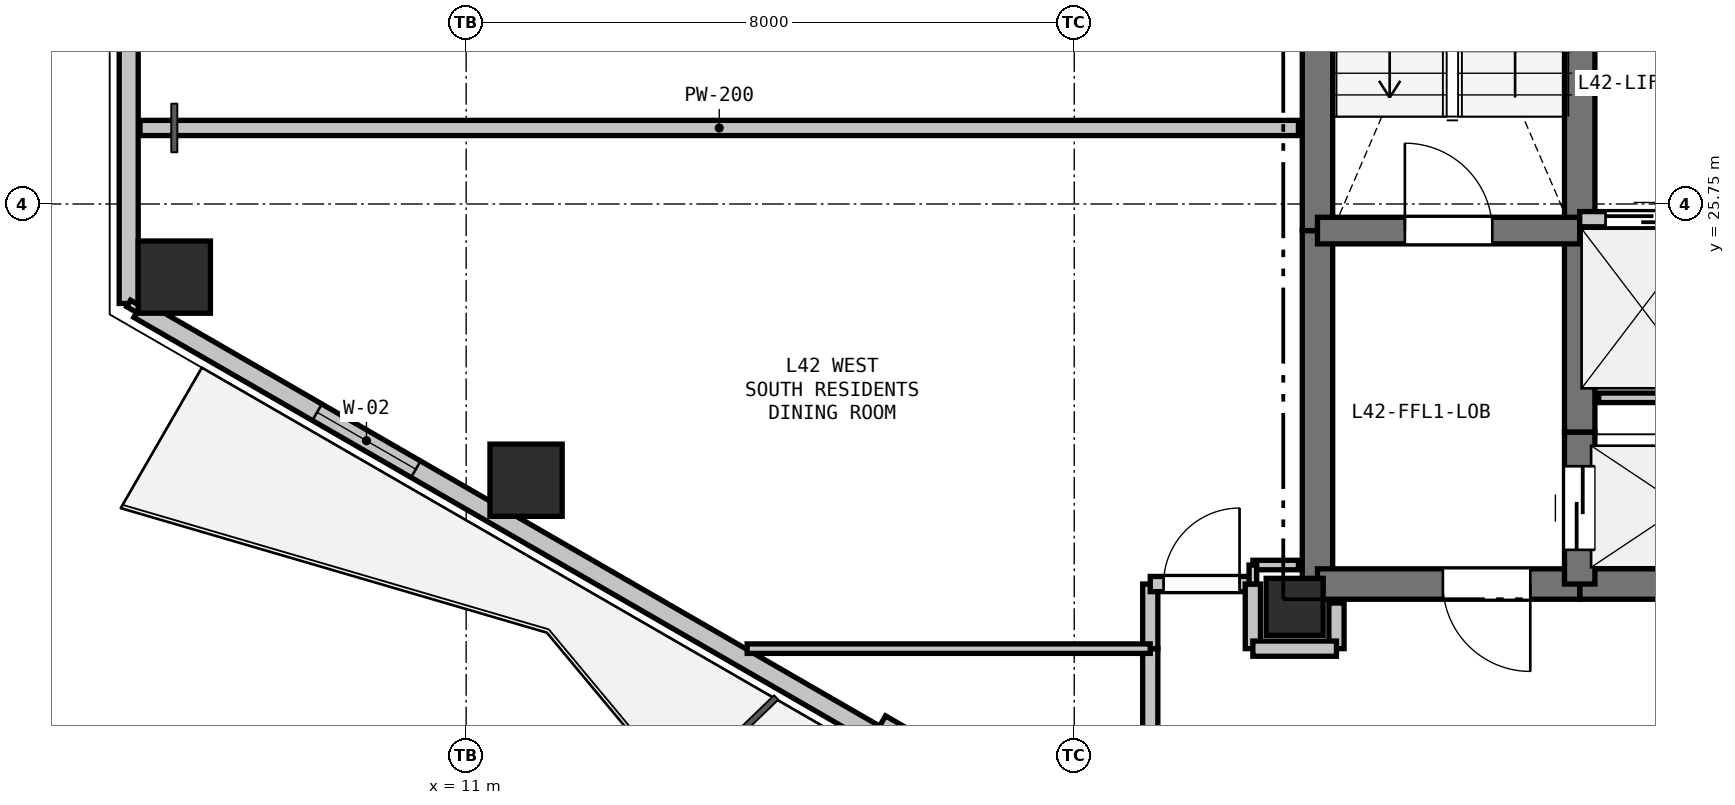
"""IFC4 building model, lengths in metres.
Left out: names, types, materials, properties, quantities, classifications, styles, units other than length and angle.
Written with IfcOpenShell. Run it as: python <this file> out.ifc"""

import sys

from ifc_helpers import new_model, si_unit, direction, frame, frame_2d, origin, origin_2d, place, context, subcontext, project, spatial, rectangle, hollow_rectangle, extrude, element, fill, save


model = new_model("IFC4")
c1 = context("Model", 3, precision=1e-05, world=origin(), true_north=direction((0.0, 1.0)))
c2 = subcontext(c1, "Body", "Model", "MODEL_VIEW")
j1 = project(units=[si_unit("LENGTHUNIT", "METRE"), si_unit("PLANEANGLEUNIT", "RADIAN")], contexts=[c1])
p1 = place(None, origin())
s1 = spatial("IfcSite", under=j1, at=p1, CompositionType="ELEMENT")
p2 = place(p1, origin())
s2 = spatial("IfcBuilding", under=s1, at=p2, CompositionType="ELEMENT")
p3 = place(p2, frame((0.0, 0.0, 150.9)))
s3 = spatial("IfcBuildingStorey", under=s2, at=p3, CompositionType="ELEMENT", Elevation=150.9)
p4 = place(p3, frame((21.9, 20.45, 0.0), z_axis=(0.0, 0.0, 1.0), x_axis=(1.0, 0.0, 0.0)))
e1 = element("IfcColumn", 1, at=p4, inside=s3, PredefinedType="COLUMN", context=c2, shape_type="SweptSolid", body=[
    extrude(rectangle(XDim=0.75, YDim=0.75, at=origin_2d()), origin(), (0.0, 0.0, 1.0), 3.3),
])
for number, where, z_axis, x_axis in (
    (2, (11.788, 22.116, 0.0), (0.0, 0.0, 1.0), (1.0, 0.0, 0.0)),
    (3, (7.16, 24.788, 0.0), (0.0, 0.0, 1.0), (1.0, 0.0, 0.0)),
):
    element("IfcColumn", number, at=place(p3, frame(where, z_axis=z_axis, x_axis=x_axis)), inside=s3, PredefinedType="COLUMN", context=c2, shape_type="SweptSolid", body=[
        extrude(hollow_rectangle(XDim=0.95, YDim=0.95, WallThickness=0.028, at=origin_2d()), origin(), (0.0, 0.0, 1.0), 3.3),
    ])
p5 = place(p3, frame((6.56, 24.441, 0.0), z_axis=(0.0, 0.0, 1.0), x_axis=(0.0, 1.0, 0.0)))
e4 = element("IfcWall", 4, at=p5, inside=s3, PredefinedType="SOLIDWALL", context=c2, shape_type="SweptSolid", body=[
    extrude(rectangle(XDim=4.617, YDim=0.25, at=frame_2d((2.309, 0.0))), origin(), (0.0, 0.0, 1.0), 2.68),
])
p6 = place(p3, frame((16.378, 18.773, 0.0), z_axis=(0.0, 0.0, 1.0), x_axis=(-0.866027848477, 0.499995765644, 0.0)))
e5 = element("IfcWall", 5, at=p6, inside=s3, PredefinedType="SOLIDWALL", context=c2, shape_type="SweptSolid", body=[
    extrude(rectangle(XDim=11.186, YDim=0.25, at=frame_2d((5.593, 0.0))), origin(), (0.0, 0.0, 1.0), 2.68),
])
p7 = place(p6, frame((6.974, 0.0, 0.9)))
e6 = element("IfcOpeningElement", 6, at=p7, cuts=e5, PredefinedType="OPENING", context=c2, shape_type="SweptSolid", body=[
    extrude(rectangle(XDim=1.5, YDim=1.5, at=frame_2d((0.75, 0.75))), frame((0.0, 0.135, 0.0), z_axis=(0.0, -1.0, 0.0), x_axis=(1.0, 0.0, 0.0)), (0.0, 0.0, 1.0), 0.27),
])
p8 = place(p3, frame((17.94, 18.079, 0.0), z_axis=(0.0, 0.0, 1.0), x_axis=(-0.865989465428, 0.500062241894, 0.0)))
e7 = element("IfcWall", 7, at=p8, inside=s3, PredefinedType="PARAPET", context=c2, shape_type="SweptSolid", body=[
    extrude(rectangle(XDim=1.7, YDim=0.2, at=frame_2d((0.85, 0.0))), origin(), (0.0, 0.0, 1.0), 2.68),
])
p9 = place(p3, frame((22.2, 20.75, 0.0), z_axis=(0.0, 0.0, 1.0), x_axis=(0.0, 1.0, 0.0)))
e8 = element("IfcWall", 8, at=p9, inside=s3, PredefinedType="SHEAR", context=c2, shape_type="SweptSolid", body=[
    extrude(rectangle(XDim=4.65, YDim=0.4, at=frame_2d((2.325, 0.0))), origin(), (0.0, 0.0, 1.0), 3.06),
])
p10 = place(p3, frame((22.2, 25.4, 0.0), z_axis=(0.0, 0.0, 1.0), x_axis=(0.0, 1.0, 0.0)))
e9 = element("IfcWall", 9, at=p10, inside=s3, PredefinedType="SHEAR", context=c2, shape_type="SweptSolid", body=[
    extrude(rectangle(XDim=7.35, YDim=0.4, at=frame_2d((3.675, 0.0))), origin(), (0.0, 0.0, 1.0), 3.06),
])
p11 = place(p3, frame((28.35, 20.75, 0.0), z_axis=(0.0, 0.0, 1.0), x_axis=(-1.0, 0.0, 0.0)))
e10 = element("IfcWall", 10, at=p11, inside=s3, PredefinedType="SHEAR", context=c2, shape_type="SweptSolid", body=[
    extrude(rectangle(XDim=2.7, YDim=0.4, at=frame_2d((1.35, 0.0))), origin(), (0.0, 0.0, 1.0), 3.06),
])
p12 = place(p3, frame((25.65, 20.75, 0.0), z_axis=(0.0, 0.0, 1.0), x_axis=(-1.0, 0.0, 0.0)))
e11 = element("IfcWall", 11, at=p12, inside=s3, PredefinedType="SHEAR", context=c2, shape_type="SweptSolid", body=[
    extrude(rectangle(XDim=3.45, YDim=0.4, at=frame_2d((1.725, 0.0))), origin(), (0.0, 0.0, 1.0), 3.06),
])
p13 = place(p12, frame((0.65, 0.0, 0.0)))
e12 = element("IfcOpeningElement", 12, at=p13, cuts=e11, PredefinedType="OPENING", context=c2, shape_type="SweptSolid", body=[
    extrude(rectangle(XDim=1.15, YDim=2.15, at=frame_2d((0.575, 1.075))), frame((0.0, 0.21, 0.0), z_axis=(0.0, -1.0, 0.0), x_axis=(1.0, 0.0, 0.0)), (0.0, 0.0, 1.0), 0.42),
])
p14 = place(p3, frame((25.65, 20.75, 0.0), z_axis=(0.0, 0.0, 1.0), x_axis=(0.0, 1.0, 0.0)))
e13 = element("IfcWall", 13, at=p14, inside=s3, PredefinedType="SHEAR", context=c2, shape_type="SweptSolid", body=[
    extrude(rectangle(XDim=2.0, YDim=0.4, at=frame_2d((1.0, 0.0))), origin(), (0.0, 0.0, 1.0), 3.06),
])
p15 = place(p14, frame((0.45, 0.0, 0.0)))
e14 = element("IfcOpeningElement", 14, at=p15, cuts=e13, PredefinedType="OPENING", context=c2, shape_type="SweptSolid", body=[
    extrude(rectangle(XDim=1.1, YDim=2.15, at=frame_2d((0.55, 1.075))), frame((0.0, 0.21, 0.0), z_axis=(0.0, -1.0, 0.0), x_axis=(1.0, 0.0, 0.0)), (0.0, 0.0, 1.0), 0.42),
])
p16 = place(p3, frame((25.65, 22.75, 0.0), z_axis=(0.0, 0.0, 1.0), x_axis=(0.0, 1.0, 0.0)))
e15 = element("IfcWall", 15, at=p16, inside=s3, PredefinedType="SHEAR", context=c2, shape_type="SweptSolid", body=[
    extrude(rectangle(XDim=2.8, YDim=0.4, at=frame_2d((1.4, 0.0))), origin(), (0.0, 0.0, 1.0), 3.06),
])
p17 = place(p3, frame((25.65, 25.55, 0.0), z_axis=(0.0, 0.0, 1.0), x_axis=(0.0, 1.0, 0.0)))
e16 = element("IfcWall", 16, at=p17, inside=s3, PredefinedType="SHEAR", context=c2, shape_type="SweptSolid", body=[
    extrude(rectangle(XDim=2.4, YDim=0.4, at=frame_2d((1.2, 0.0))), origin(), (0.0, 0.0, 1.0), 3.06),
])
p18 = place(p3, frame((22.2, 25.4, 0.0), z_axis=(0.0, 0.0, 1.0), x_axis=(1.0, 0.0, 0.0)))
e17 = element("IfcWall", 17, at=p18, inside=s3, PredefinedType="SHEAR", context=c2, shape_type="SweptSolid", body=[
    extrude(rectangle(XDim=3.45, YDim=0.35, at=frame_2d((1.725, 0.0))), origin(), (0.0, 0.0, 1.0), 3.06),
])
p19 = place(p18, frame((1.15, 0.0, 0.0)))
e18 = element("IfcOpeningElement", 18, at=p19, cuts=e17, PredefinedType="OPENING", context=c2, shape_type="SweptSolid", body=[
    extrude(rectangle(XDim=1.15, YDim=2.15, at=frame_2d((0.575, 1.075))), frame((0.0, 0.185, 0.0), z_axis=(0.0, -1.0, 0.0), x_axis=(1.0, 0.0, 0.0)), (0.0, 0.0, 1.0), 0.37),
])
p20 = place(p3, frame((25.65, 25.55, 0.0), z_axis=(0.0, 0.0, 1.0), x_axis=(1.0, 0.0, 0.0)))
e19 = element("IfcWall", 19, at=p20, inside=s3, PredefinedType="PARTITIONING", context=c2, shape_type="SweptSolid", body=[
    extrude(rectangle(XDim=4.95, YDim=0.2, at=frame_2d((2.475, 0.0))), origin(), (0.0, 0.0, 1.0), 3.06),
])
p21 = place(p20, frame((0.34, 0.0, 0.0)))
e20 = element("IfcOpeningElement", 20, at=p21, cuts=e19, PredefinedType="OPENING", context=c2, shape_type="SweptSolid", body=[
    extrude(rectangle(XDim=1.1, YDim=2.15, at=frame_2d((0.55, 1.075))), frame((0.0, 0.11, 0.0), z_axis=(0.0, -1.0, 0.0), x_axis=(1.0, 0.0, 0.0)), (0.0, 0.0, 1.0), 0.22),
])
p22 = place(p20, frame((1.99, 0.0, 0.0)))
e21 = element("IfcOpeningElement", 21, at=p22, cuts=e19, PredefinedType="OPENING", context=c2, shape_type="SweptSolid", body=[
    extrude(rectangle(XDim=1.1, YDim=2.15, at=frame_2d((0.55, 1.075))), frame((0.0, 0.11, 0.0), z_axis=(0.0, -1.0, 0.0), x_axis=(1.0, 0.0, 0.0)), (0.0, 0.0, 1.0), 0.22),
])
p23 = place(p20, frame((3.64, 0.0, 0.0)))
e22 = element("IfcOpeningElement", 22, at=p23, cuts=e19, PredefinedType="OPENING", context=c2, shape_type="SweptSolid", body=[
    extrude(rectangle(XDim=1.1, YDim=2.15, at=frame_2d((0.55, 1.075))), frame((0.0, 0.11, 0.0), z_axis=(0.0, -1.0, 0.0), x_axis=(1.0, 0.0, 0.0)), (0.0, 0.0, 1.0), 0.22),
])
p24 = place(p3, frame((25.9, 23.2, 0.0), z_axis=(0.0, 0.0, 1.0), x_axis=(1.0, 0.0, 0.0)))
e23 = element("IfcWall", 23, at=p24, inside=s3, PredefinedType="PARTITIONING", context=c2, shape_type="SweptSolid", body=[
    extrude(rectangle(XDim=1.4, YDim=0.125, at=frame_2d((0.7, 0.0))), origin(), (0.0, 0.0, 1.0), 3.06),
])
p25 = place(p3, frame((22.45, 19.9, 0.0), z_axis=(0.0, 0.0, 1.0), x_axis=(0.0, 1.0, 0.0)))
e24 = element("IfcWall", 24, at=p25, inside=s3, PredefinedType="PARTITIONING", context=c2, shape_type="SweptSolid", body=[
    extrude(rectangle(XDim=0.6, YDim=0.2, at=frame_2d((0.3, 0.0))), origin(), (0.0, 0.0, 1.0), 2.433),
])
p26 = place(p3, frame((20.0, 18.15, 0.0), z_axis=(0.0, 0.0, 1.0), x_axis=(0.0, 1.0, 0.0)))
e25 = element("IfcWall", 25, at=p26, inside=s3, PredefinedType="PARTITIONING", context=c2, shape_type="SweptSolid", body=[
    extrude(rectangle(XDim=1.75, YDim=0.2, at=frame_2d((0.875, 0.0))), origin(), (0.0, 0.0, 1.0), 3.06),
])
p27 = place(p3, frame((20.0, 19.9, 0.0), z_axis=(0.0, 0.0, 1.0), x_axis=(0.0, 1.0, 0.0)))
e26 = element("IfcWall", 26, at=p27, inside=s3, PredefinedType="PARTITIONING", context=c2, shape_type="SweptSolid", body=[
    extrude(rectangle(XDim=0.85, YDim=0.2, at=frame_2d((0.425, 0.0))), origin(), (0.0, 0.0, 1.0), 3.06),
])
p28 = place(p3, frame((20.0, 20.75, 0.0), z_axis=(0.0, 0.0, 1.0), x_axis=(1.0, 0.0, 0.0)))
e27 = element("IfcWall", 27, at=p28, inside=s3, PredefinedType="PARTITIONING", context=c2, shape_type="SweptSolid", body=[
    extrude(rectangle(XDim=1.35, YDim=0.2, at=frame_2d((0.675, 0.0))), origin(), (0.0, 0.0, 1.0), 2.433),
])
p29 = place(p28, frame((0.175, 0.0, 0.0)))
e28 = element("IfcOpeningElement", 28, at=p29, cuts=e27, PredefinedType="OPENING", context=c2, shape_type="SweptSolid", body=[
    extrude(rectangle(XDim=1.0, YDim=2.15, at=frame_2d((0.5, 1.075))), frame((0.0, 0.11, 0.0), z_axis=(0.0, -1.0, 0.0), x_axis=(1.0, 0.0, 0.0)), (0.0, 0.0, 1.0), 0.22),
])
p30 = place(p3, frame((21.35, 20.75, 0.0), z_axis=(0.0, 0.0, 1.0), x_axis=(0.0, -1.0, 0.0)))
e29 = element("IfcWall", 29, at=p30, inside=s3, PredefinedType="PARTITIONING", context=c2, shape_type="SweptSolid", body=[
    extrude(rectangle(XDim=0.85, YDim=0.2, at=frame_2d((0.425, 0.0))), origin(), (0.0, 0.0, 1.0), 2.433),
])
p31 = place(p3, frame((21.35, 19.9, 0.0), z_axis=(0.0, 0.0, 1.0), x_axis=(1.0, 0.0, 0.0)))
e30 = element("IfcWall", 30, at=p31, inside=s3, PredefinedType="PARTITIONING", context=c2, shape_type="SweptSolid", body=[
    extrude(rectangle(XDim=1.1, YDim=0.2, at=frame_2d((0.55, 0.0))), origin(), (0.0, 0.0, 1.0), 2.433),
])
p32 = place(p3, frame((6.709, 26.75, 0.0), z_axis=(0.0, 0.0, 1.0), x_axis=(1.0, 0.0, 0.0)))
e31 = element("IfcWall", 31, at=p32, inside=s3, PredefinedType="PARTITIONING", context=c2, shape_type="SweptSolid", body=[
    extrude(rectangle(XDim=15.241, YDim=0.2, at=frame_2d((7.62, 0.0))), origin(), (0.0, 0.0, 1.0), 2.585),
])
p33 = place(p3, frame((21.95, 21.0, 0.0), z_axis=(0.0, 0.0, 1.0), x_axis=(-1.0, 0.0, 0.0)))
e32 = element("IfcWall", 32, at=p33, inside=s3, PredefinedType="PARTITIONING", context=c2, shape_type="SweptSolid", body=[
    extrude(rectangle(XDim=0.6, YDim=0.125, at=frame_2d((0.3, 0.0))), origin(), (0.0, 0.0, 1.0), 2.585),
])
p34 = place(p3, frame((21.35, 21.0, 0.0), z_axis=(0.0, 0.0, 1.0), x_axis=(0.0, -1.0, 0.0)))
e33 = element("IfcWall", 33, at=p34, inside=s3, PredefinedType="PARTITIONING", context=c2, shape_type="SweptSolid", body=[
    extrude(rectangle(XDim=0.25, YDim=0.1, at=frame_2d((0.125, 0.0))), origin(), (0.0, 0.0, 1.0), 3.06),
])
p35 = place(p3, frame((20.0, 19.9, 0.0), z_axis=(0.0, 0.0, 1.0), x_axis=(-1.0, 0.0, 0.0)))
e34 = element("IfcWall", 34, at=p35, inside=s3, PredefinedType="PARTITIONING", context=c2, shape_type="SweptSolid", body=[
    extrude(rectangle(XDim=5.303, YDim=0.125, at=frame_2d((2.651, 0.0))), origin(), (0.0, 0.0, 1.0), 2.365),
])
p36 = place(p3, frame((6.69, 24.366, 0.0), z_axis=(0.0, 0.0, 1.0), x_axis=(-0.866131372301, 0.499816412211, 0.0)))
e35 = element("IfcWall", 35, at=p36, inside=s3, PredefinedType="PARTITIONING", context=c2, shape_type="SweptSolid", body=[
    extrude(rectangle(XDim=0.15, YDim=0.1, at=frame_2d((0.075, 0.0))), origin(), (0.0, 0.0, 1.0), 3.06),
])
p37 = place(p7, origin())
e36 = element("IfcWindow", 36, at=p37, inside=s3, PartitioningType="SINGLE_PANEL", PredefinedType="WINDOW", context=c2, shape_type="SweptSolid", body=[
    extrude(rectangle(XDim=1.5, YDim=1.5, at=frame_2d((0.75, 0.75))), frame((0.0, 0.03, 0.0), z_axis=(0.0, -1.0, 0.0), x_axis=(1.0, 0.0, 0.0)), (0.0, 0.0, 1.0), 0.06),
])
fill(e6, e36)
p38 = place(p21, origin())
e37 = element("IfcDoor", 37, at=p38, inside=s3, OperationType="SLIDING_TO_LEFT", PredefinedType="DOOR", context=c2, shape_type="SweptSolid", body=[
    extrude(rectangle(XDim=1.1, YDim=2.15, at=frame_2d((0.55, 1.075))), frame((0.0, 0.025, 0.0), z_axis=(0.0, -1.0, 0.0), x_axis=(1.0, 0.0, 0.0)), (0.0, 0.0, 1.0), 0.05),
])
fill(e20, e37)
p39 = place(p15, origin())
e38 = element("IfcDoor", 38, at=p39, inside=s3, OperationType="SLIDING_TO_LEFT", PredefinedType="DOOR", context=c2, shape_type="SweptSolid", body=[
    extrude(rectangle(XDim=1.1, YDim=2.15, at=frame_2d((0.55, 1.075))), frame((0.0, 0.025, 0.0), z_axis=(0.0, -1.0, 0.0), x_axis=(1.0, 0.0, 0.0)), (0.0, 0.0, 1.0), 0.05),
])
fill(e14, e38)
p40 = place(p19, origin())
e39 = element("IfcDoor", 39, at=p40, inside=s3, OperationType="SINGLE_SWING_LEFT", PredefinedType="DOOR", context=c2, shape_type="SweptSolid", body=[
    extrude(rectangle(XDim=1.15, YDim=2.15, at=frame_2d((0.575, 1.075))), frame((0.0, 0.025, 0.0), z_axis=(0.0, -1.0, 0.0), x_axis=(1.0, 0.0, 0.0)), (0.0, 0.0, 1.0), 0.05),
])
fill(e18, e39)
p41 = place(p13, origin())
e40 = element("IfcDoor", 40, at=p41, inside=s3, OperationType="SINGLE_SWING_LEFT", PredefinedType="DOOR", context=c2, shape_type="SweptSolid", body=[
    extrude(rectangle(XDim=1.15, YDim=2.15, at=frame_2d((0.575, 1.075))), frame((0.0, 0.025, 0.0), z_axis=(0.0, -1.0, 0.0), x_axis=(1.0, 0.0, 0.0)), (0.0, 0.0, 1.0), 0.05),
])
fill(e12, e40)
p42 = place(p29, origin())
e41 = element("IfcDoor", 41, at=p42, inside=s3, OperationType="SINGLE_SWING_RIGHT", PredefinedType="DOOR", context=c2, shape_type="SweptSolid", body=[
    extrude(rectangle(XDim=1.0, YDim=2.15, at=frame_2d((0.5, 1.075))), frame((0.0, 0.025, 0.0), z_axis=(0.0, -1.0, 0.0), x_axis=(1.0, 0.0, 0.0)), (0.0, 0.0, 1.0), 0.05),
])
fill(e28, e41)
save(model, sys.argv[1])
